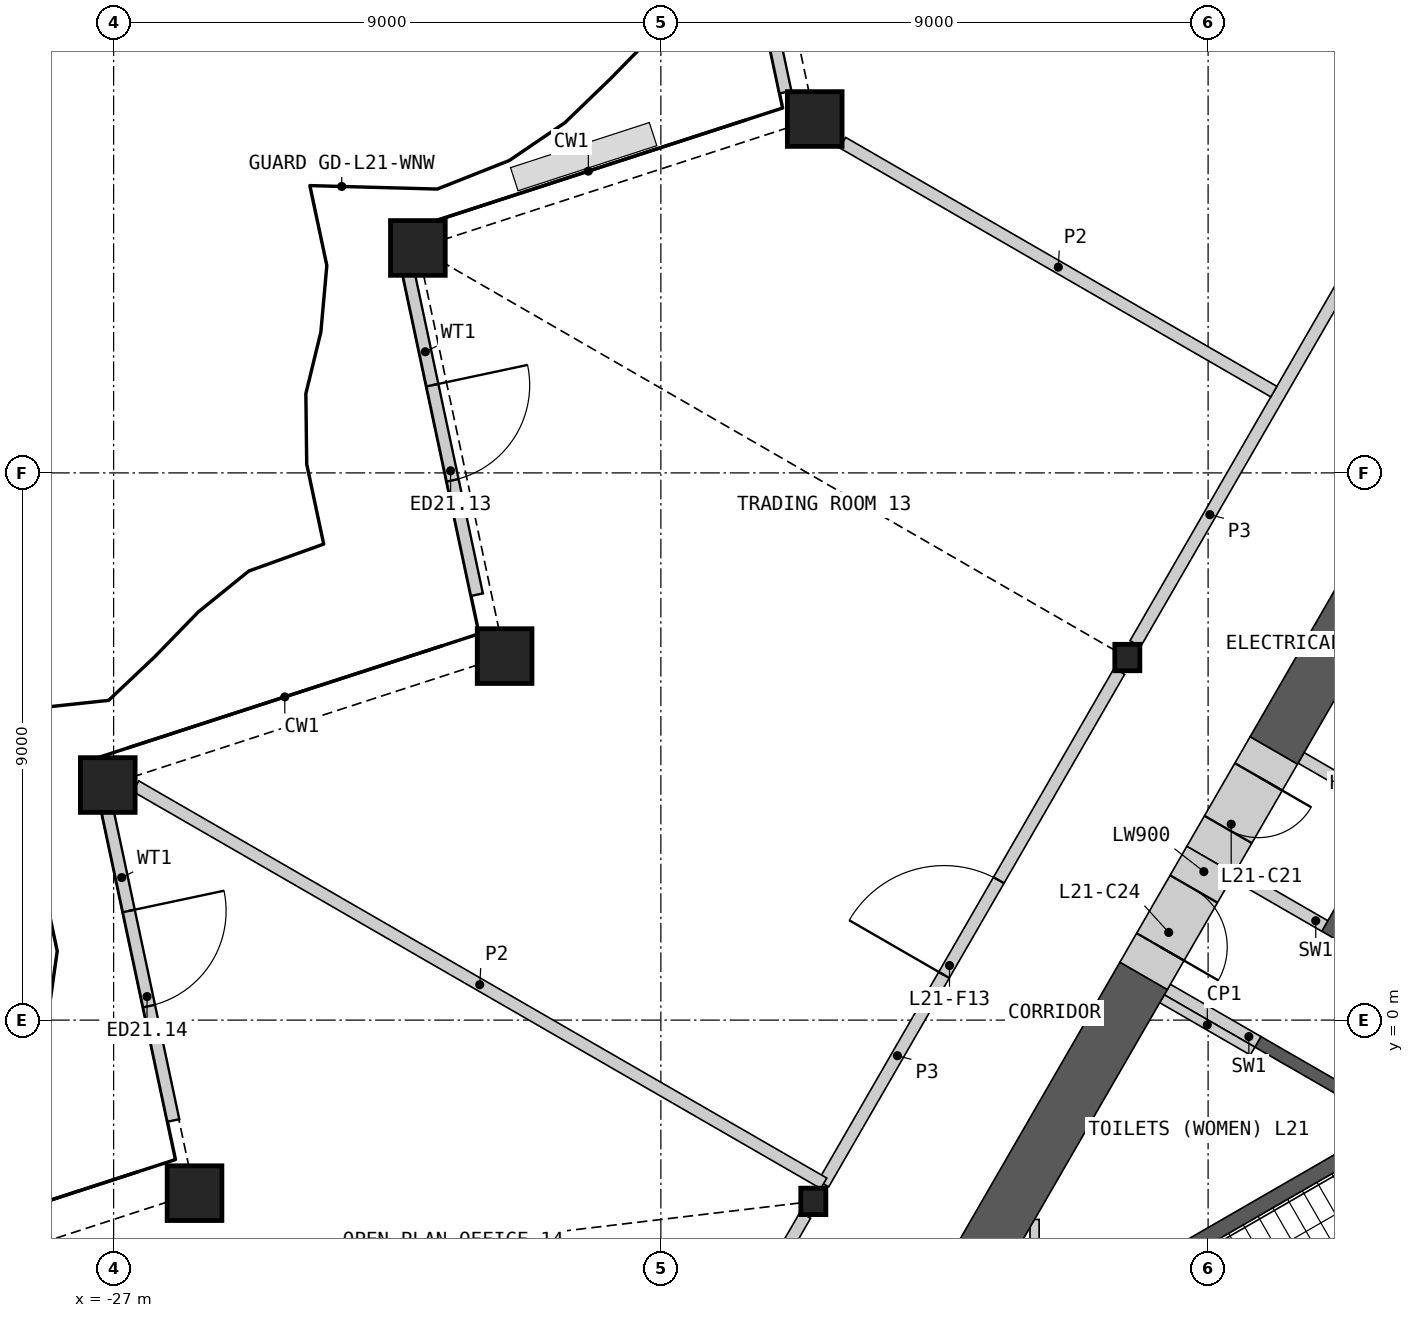
"""IFC4 building model, lengths in metres.
Left out: names, types, materials, properties, quantities, classifications, styles, units other than length and angle.
Written with IfcOpenShell. Run it as: python <this file> out.ifc"""

import sys

from ifc_helpers import new_model, si_unit, direction, frame, frame_2d, origin, origin_2d, place, context, subcontext, project, spatial, polyline, rectangle, hollow_rectangle, i_section, outline, extrude, element, fill, save


model = new_model("IFC4")
c1 = context("Model", 3, precision=1e-05, world=origin(), true_north=direction((0.0, 1.0)))
c2 = subcontext(c1, "Body", "Model", "MODEL_VIEW")
j1 = project(units=[si_unit("LENGTHUNIT", "METRE"), si_unit("PLANEANGLEUNIT", "RADIAN")], contexts=[c1])
p1 = place(None, origin())
s1 = spatial("IfcSite", under=j1, at=p1, CompositionType="ELEMENT")
p2 = place(p1, origin())
s2 = spatial("IfcBuilding", under=s1, at=p2, CompositionType="ELEMENT")
p3 = place(p2, frame((0.0, 0.0, 103.8)))
s3 = spatial("IfcBuildingStorey", under=s2, at=p3, CompositionType="ELEMENT", Elevation=103.8)
for number, where, z_axis, x_axis in (
    (1, (-15.469, 14.82, 0.0), (0.0, 0.0, 1.0), (1.0, 0.0, 0.0)),
    (2, (-21.996, 12.699, 0.0), (0.0, 0.0, 1.0), (1.0, 0.0, 0.0)),
    (3, (-20.57, 5.987, 0.0), (0.0, 0.0, 1.0), (1.0, 0.0, 0.0)),
    (4, (-27.096, 3.866, 0.0), (0.0, 0.0, 1.0), (1.0, 0.0, 0.0)),
    (5, (-25.669, -2.846, 0.0), (0.0, 0.0, 1.0), (1.0, 0.0, 0.0)),
):
    element("IfcColumn", number, at=place(p3, frame(where, z_axis=z_axis, x_axis=x_axis)), inside=s3, PredefinedType="COLUMN", context=c2, shape_type="SweptSolid", body=[
        extrude(hollow_rectangle(XDim=0.9, YDim=0.9, WallThickness=0.06, at=origin_2d()), origin(), (0.0, 0.0, 1.0), 4.2),
    ])
for number, where, z_axis, x_axis in (
    (6, (-10.328, 5.963, 0.0), (0.0, 0.0, 1.0), (1.0, 0.0, 0.0)),
    (7, (-15.493, -2.982, 0.0), (0.0, 0.0, 1.0), (1.0, 0.0, 0.0)),
):
    element("IfcColumn", number, at=place(p3, frame(where, z_axis=z_axis, x_axis=x_axis)), inside=s3, PredefinedType="COLUMN", context=c2, shape_type="SweptSolid", body=[
        extrude(i_section(OverallWidth=0.412, OverallDepth=0.435, WebThickness=0.036, FlangeThickness=0.057, at=origin_2d()), origin(), (0.0, 0.0, 1.0), 4.2),
    ])
p4 = place(p3, frame((-17.185, 21.066, 0.0), z_axis=(0.0, 0.0, 1.0), x_axis=(0.207930102794, -0.978143686966, 0.0)))
e8 = element("IfcWall", 8, at=p4, inside=s3, PredefinedType="SOLIDWALL", context=c2, shape_type="SweptSolid", body=[
    extrude(rectangle(XDim=5.934, YDim=0.2, at=frame_2d((2.967, 0.0))), origin(), (0.0, 0.0, 1.0), 3.189),
])
p5 = place(p4, frame((2.02, 0.0, 0.0)))
e9 = element("IfcOpeningElement", 9, at=p5, cuts=e8, PredefinedType="OPENING", context=c2, shape_type="SweptSolid", body=[
    extrude(rectangle(XDim=1.6, YDim=2.4, at=frame_2d((0.8, 1.2))), frame((0.0, 0.11, 0.0), z_axis=(0.0, -1.0, 0.0), x_axis=(1.0, 0.0, 0.0)), (0.0, 0.0, 1.0), 0.22),
])
p6 = place(p3, frame((-22.157, 12.324, 0.0), z_axis=(0.0, 0.0, 1.0), x_axis=(0.207903253291, -0.978149394148, 0.0)))
e10 = element("IfcWall", 10, at=p6, inside=s3, PredefinedType="SOLIDWALL", context=c2, shape_type="SweptSolid", body=[
    extrude(rectangle(XDim=5.446, YDim=0.2, at=frame_2d((2.723, 0.0))), origin(), (0.0, 0.0, 1.0), 3.189),
])
p7 = place(p6, frame((1.923, 0.0, 0.0)))
e11 = element("IfcOpeningElement", 11, at=p7, cuts=e10, PredefinedType="OPENING", context=c2, shape_type="SweptSolid", body=[
    extrude(rectangle(XDim=1.6, YDim=2.4, at=frame_2d((0.8, 1.2))), frame((0.0, 0.11, 0.0), z_axis=(0.0, -1.0, 0.0), x_axis=(1.0, 0.0, 0.0)), (0.0, 0.0, 1.0), 0.22),
])
p8 = place(p3, frame((-27.15, 3.676, 0.0), z_axis=(0.0, 0.0, 1.0), x_axis=(0.207912369528, -0.978147456469, 0.0)))
e12 = element("IfcWall", 12, at=p8, inside=s3, PredefinedType="SOLIDWALL", context=c2, shape_type="SweptSolid", body=[
    extrude(rectangle(XDim=5.446, YDim=0.2, at=frame_2d((2.723, 0.0))), origin(), (0.0, 0.0, 1.0), 3.189),
])
p9 = place(p8, frame((1.923, 0.0, 0.0)))
e13 = element("IfcOpeningElement", 13, at=p9, cuts=e12, PredefinedType="OPENING", context=c2, shape_type="SweptSolid", body=[
    extrude(rectangle(XDim=1.6, YDim=2.4, at=frame_2d((0.8, 1.2))), frame((0.0, 0.11, 0.0), z_axis=(0.0, -1.0, 0.0), x_axis=(1.0, 0.0, 0.0)), (0.0, 0.0, 1.0), 0.22),
])
p10 = place(p3, origin())
e14 = element("IfcWall", 14, at=p10, inside=s3, PredefinedType="SHEAR", context=c2, shape_type="SweptSolid", body=[
    extrude(outline(polyline([(-6.061, -1.697), (-8.231, -0.444), (-8.131, -0.271), (-5.96, -1.524), (-6.061, -1.697)])), origin(), (0.0, 0.0, 1.0), 3.8),
])
p11 = place(p3, origin())
e15 = element("IfcWall", 15, at=p11, inside=s3, PredefinedType="SHEAR", context=c2, shape_type="SweptSolid", body=[
    extrude(outline(polyline([(-4.96, 0.208), (-7.131, 1.461), (-5.931, 3.54), (-3.76, 2.287), (-3.861, 2.113), (-5.852, 3.263), (-6.852, 1.531), (-4.861, 0.381), (-4.96, 0.208)])), origin(), (0.0, 0.0, 1.0), 3.8),
])
p12 = place(p3, frame((-5.981, 3.453, 0.0), z_axis=(0.0, 0.0, 1.0), x_axis=(-0.866060346521, 0.499939472521, 0.0)))
e16 = element("IfcWall", 16, at=p12, inside=s3, PredefinedType="SHEAR", context=c2, shape_type="SweptSolid", body=[
    extrude(rectangle(XDim=1.72, YDim=0.2, at=frame_2d((0.86, 0.0))), origin(), (0.0, 0.0, 1.0), 3.8),
])
for number, where, z_axis, x_axis in (
    (17, (-7.081, 1.548, 0.0), (0.0, 0.0, 1.0), (-0.866, 0.5, 0.0)),
    (18, (-8.181, -0.357, 0.0), (0.0, 0.0, 1.0), (-0.866, 0.5, 0.0)),
):
    element("IfcWall", number, at=place(p3, frame(where, z_axis=z_axis, x_axis=x_axis)), inside=s3, PredefinedType="SHEAR", context=c2, shape_type="SweptSolid", body=[
        extrude(rectangle(XDim=1.72, YDim=0.2, at=frame_2d((0.86, 0.0))), origin(), (0.0, 0.0, 1.0), 3.8),
    ])
p13 = place(p3, origin())
e19 = element("IfcWall", 19, at=p13, inside=s3, PredefinedType="SHEAR", context=c2, shape_type="SweptSolid", body=[
    extrude(outline(polyline([(-5.307, -1.281), (-10.374, -4.206), (-10.032, -4.298), (-5.182, -1.498), (-5.307, -1.281)])), origin(), (0.0, 0.0, 1.0), 3.8),
])
p14 = place(p3, frame((-8.268, -0.509, 0.0), z_axis=(0.0, 0.0, 1.0), x_axis=(-0.866024871741, 0.500000921525, 0.0)))
e20 = element("IfcWall", 20, at=p14, inside=s3, PredefinedType="PARTITIONING", context=c2, shape_type="SweptSolid", body=[
    extrude(rectangle(XDim=1.72, YDim=0.15, at=frame_2d((0.86, 0.0))), origin(), (0.0, 0.0, 1.0), 3.8),
])
p15 = place(p3, frame((-11.854, -8.626, 0.0), z_axis=(0.0, 0.0, 1.0), x_axis=(0.0, 1.0, 0.0)))
e21 = element("IfcWall", 21, at=p15, inside=s3, PredefinedType="PARTITIONING", context=c2, shape_type="SweptSolid", body=[
    extrude(rectangle(XDim=5.347, YDim=0.15, at=frame_2d((2.674, 0.0))), origin(), (0.0, 0.0, 1.0), 3.8),
])
p16 = place(p3, frame((-3.512, 12.069, 0.0), z_axis=(0.0, 0.0, 1.0), x_axis=(-0.500002126466, -0.866024176065, 0.0)))
e22 = element("IfcWall", 22, at=p16, inside=s3, PredefinedType="SHEAR", context=c2, shape_type="SweptSolid", body=[
    extrude(rectangle(XDim=8.816, YDim=0.9, at=frame_2d((4.408, 0.0))), origin(), (0.0, 0.0, 1.0), 3.8),
])
p17 = place(p3, frame((-10.06, 0.728, 0.0), z_axis=(0.0, 0.0, 1.0), x_axis=(-0.500002975332, -0.866023685969, 0.0)))
e23 = element("IfcWall", 23, at=p17, inside=s3, PredefinedType="SHEAR", context=c2, shape_type="SweptSolid", body=[
    extrude(rectangle(XDim=6.429, YDim=0.9, at=frame_2d((3.214, 0.0))), origin(), (0.0, 0.0, 1.0), 3.8),
])
p18 = place(p3, frame((-7.92, 4.434, 0.0), z_axis=(0.0, 0.0, 1.0), x_axis=(-0.499939227269, -0.866060488094, 0.0)))
e24 = element("IfcWall", 24, at=p18, inside=s3, PredefinedType="SHEAR", context=c2, shape_type="SweptSolid", body=[
    extrude(rectangle(XDim=2.08, YDim=0.9, at=frame_2d((1.04, 0.0))), origin(), (0.0, 0.0, 1.0), 3.8),
])
p19 = place(p18, frame((0.5, 0.0, 0.0)))
e25 = element("IfcOpeningElement", 25, at=p19, cuts=e24, PredefinedType="OPENING", context=c2, shape_type="SweptSolid", body=[
    extrude(rectangle(XDim=1.0, YDim=2.1, at=frame_2d((0.5, 1.05))), frame((0.0, 0.46, 0.0), z_axis=(0.0, -1.0, 0.0), x_axis=(1.0, 0.0, 0.0)), (0.0, 0.0, 1.0), 0.92),
])
p20 = place(p3, frame((-8.96, 2.633, 0.0), z_axis=(0.0, 0.0, 1.0), x_axis=(-0.50002983664, -0.866008176907, 0.0)))
e26 = element("IfcWall", 26, at=p20, inside=s3, PredefinedType="SHEAR", context=c2, shape_type="SweptSolid", body=[
    extrude(rectangle(XDim=2.2, YDim=0.9, at=frame_2d((1.1, 0.0))), origin(), (0.0, 0.0, 1.0), 3.8),
])
p21 = place(p20, frame((0.55, 0.0, 0.0)))
e27 = element("IfcOpeningElement", 27, at=p21, cuts=e26, PredefinedType="OPENING", context=c2, shape_type="SweptSolid", body=[
    extrude(rectangle(XDim=1.1, YDim=2.1, at=frame_2d((0.55, 1.05))), frame((0.0, 0.46, 0.0), z_axis=(0.0, -1.0, 0.0), x_axis=(1.0, 0.0, 0.0)), (0.0, 0.0, 1.0), 0.92),
])
p22 = place(p3, frame((-10.197, 6.19, 0.0), z_axis=(0.0, 0.0, 1.0), x_axis=(0.500012035596, 0.866018454918, 0.0)))
e28 = element("IfcWall", 28, at=p22, inside=s3, PredefinedType="PARTITIONING", context=c2, shape_type="SweptSolid", body=[
    extrude(rectangle(XDim=9.803, YDim=0.2, at=frame_2d((4.902, 0.0))), origin(), (0.0, 0.0, 1.0), 3.8),
])
p23 = place(p3, frame((-15.326, -2.693, 0.0), z_axis=(0.0, 0.0, 1.0), x_axis=(0.500010522431, 0.866019328571, 0.0)))
e29 = element("IfcWall", 29, at=p23, inside=s3, PredefinedType="PARTITIONING", context=c2, shape_type="SweptSolid", body=[
    extrude(rectangle(XDim=9.733, YDim=0.2, at=frame_2d((4.866, 0.0))), origin(), (0.0, 0.0, 1.0), 3.8),
])
p24 = place(p23, frame((3.966, 0.0, 0.0)))
e30 = element("IfcOpeningElement", 30, at=p24, cuts=e29, PredefinedType="OPENING", context=c2, shape_type="SweptSolid", body=[
    extrude(rectangle(XDim=1.8, YDim=2.1, at=frame_2d((0.9, 1.05))), frame((0.0, 0.11, 0.0), z_axis=(0.0, -1.0, 0.0), x_axis=(1.0, 0.0, 0.0)), (0.0, 0.0, 1.0), 0.22),
])
p25 = place(p3, frame((-18.744, -8.613, 0.0), z_axis=(0.0, 0.0, 1.0), x_axis=(0.499997920671, 0.866026604282, 0.0)))
e31 = element("IfcWall", 31, at=p25, inside=s3, PredefinedType="PARTITIONING", context=c2, shape_type="SweptSolid", body=[
    extrude(rectangle(XDim=6.24, YDim=0.2, at=frame_2d((3.12, 0.0))), origin(), (0.0, 0.0, 1.0), 3.8),
])
p26 = place(p25, frame((2.67, 0.0, 0.0)))
e32 = element("IfcOpeningElement", 32, at=p26, cuts=e31, PredefinedType="OPENING", context=c2, shape_type="SweptSolid", body=[
    extrude(rectangle(XDim=1.0, YDim=2.1, at=frame_2d((0.5, 1.05))), frame((0.0, 0.11, 0.0), z_axis=(0.0, -1.0, 0.0), x_axis=(1.0, 0.0, 0.0)), (0.0, 0.0, 1.0), 0.22),
])
p27 = place(p3, frame((-26.636, 3.848, 0.0), z_axis=(0.0, 0.0, 1.0), x_axis=(0.866029068465, -0.499993652534, 0.0)))
e33 = element("IfcWall", 33, at=p27, inside=s3, PredefinedType="PARTITIONING", context=c2, shape_type="SweptSolid", body=[
    extrude(rectangle(XDim=13.066, YDim=0.2, at=frame_2d((6.533, 0.0))), origin(), (0.0, 0.0, 1.0), 2.885),
])
p28 = place(p3, frame((-15.01, 14.431, 0.0), z_axis=(0.0, 0.0, 1.0), x_axis=(0.866019738461, -0.5000098125, 0.0)))
e34 = element("IfcWall", 34, at=p28, inside=s3, PredefinedType="PARTITIONING", context=c2, shape_type="SweptSolid", body=[
    extrude(rectangle(XDim=8.188, YDim=0.2, at=frame_2d((4.094, 0.0))), origin(), (0.0, 0.0, 1.0), 2.885),
])
p29 = place(p7, origin())
e35 = element("IfcDoor", 35, at=p29, inside=s3, OperationType="DOUBLE_DOOR_SINGLE_SWING", PredefinedType="DOOR", context=c2, shape_type="SweptSolid", body=[
    extrude(rectangle(XDim=1.6, YDim=2.4, at=frame_2d((0.8, 1.2))), frame((0.0, 0.025, 0.0), z_axis=(0.0, -1.0, 0.0), x_axis=(1.0, 0.0, 0.0)), (0.0, 0.0, 1.0), 0.05),
])
fill(e11, e35)
p30 = place(p9, origin())
e36 = element("IfcDoor", 36, at=p30, inside=s3, OperationType="DOUBLE_DOOR_SINGLE_SWING", PredefinedType="DOOR", context=c2, shape_type="SweptSolid", body=[
    extrude(rectangle(XDim=1.6, YDim=2.4, at=frame_2d((0.8, 1.2))), frame((0.0, 0.025, 0.0), z_axis=(0.0, -1.0, 0.0), x_axis=(1.0, 0.0, 0.0)), (0.0, 0.0, 1.0), 0.05),
])
fill(e13, e36)
p31 = place(p19, origin())
e37 = element("IfcDoor", 37, at=p31, inside=s3, OperationType="SINGLE_SWING_LEFT", PredefinedType="DOOR", context=c2, shape_type="SweptSolid", body=[
    extrude(rectangle(XDim=1.0, YDim=2.1, at=frame_2d((0.5, 1.05))), frame((0.0, 0.205, 0.0), z_axis=(0.0, -1.0, 0.0), x_axis=(1.0, 0.0, 0.0)), (0.0, 0.0, 1.0), 0.05),
])
fill(e25, e37)
p32 = place(p21, origin())
e38 = element("IfcDoor", 38, at=p32, inside=s3, OperationType="SINGLE_SWING_RIGHT", PredefinedType="DOOR", context=c2, shape_type="SweptSolid", body=[
    extrude(rectangle(XDim=1.1, YDim=2.1, at=frame_2d((0.55, 1.05))), frame((0.0, 0.205, 0.0), z_axis=(0.0, -1.0, 0.0), x_axis=(1.0, 0.0, 0.0)), (0.0, 0.0, 1.0), 0.05),
])
fill(e27, e38)
p33 = place(p24, origin())
e39 = element("IfcDoor", 39, at=p33, inside=s3, OperationType="DOUBLE_DOOR_SINGLE_SWING", PredefinedType="DOOR", context=c2, shape_type="SweptSolid", body=[
    extrude(rectangle(XDim=1.8, YDim=2.1, at=frame_2d((0.9, 1.05))), frame((0.0, 0.025, 0.0), z_axis=(0.0, -1.0, 0.0), x_axis=(1.0, 0.0, 0.0)), (0.0, 0.0, 1.0), 0.05),
])
fill(e30, e39)
save(model, sys.argv[1])
